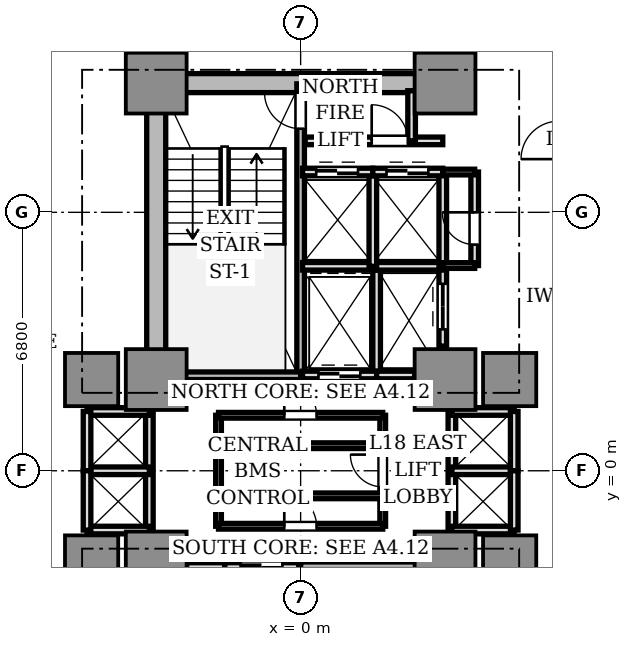
"""IFC4 building model, lengths in metres.
Left out: names, types, materials, properties, quantities, classifications, styles, units other than length and angle.
Written with IfcOpenShell. Run it as: python <this file> out.ifc"""

import sys

from ifc_helpers import new_model, si_unit, direction, frame, frame_2d, origin, origin_2d, place, context, subcontext, project, spatial, rectangle, extrude, source, transform, mapped, element, fill, save


model = new_model("IFC4")
c1 = context("Model", 3, precision=1e-05, world=origin(), true_north=direction((0.0, 1.0)))
c2 = subcontext(c1, "Body", "Model", "MODEL_VIEW")
j1 = project(units=[si_unit("LENGTHUNIT", "METRE"), si_unit("PLANEANGLEUNIT", "RADIAN")], contexts=[c1])
p1 = place(None, origin())
s1 = spatial("IfcSite", under=j1, at=p1, CompositionType="ELEMENT")
p2 = place(p1, origin())
s2 = spatial("IfcBuilding", under=s1, at=p2, CompositionType="ELEMENT")
p3 = place(p2, frame((0.0, 0.0, 67.8)))
s3 = spatial("IfcBuildingStorey", under=s2, at=p3, CompositionType="ELEMENT", Elevation=67.8)
p4 = place(p3, frame((-3.55, 10.2, 0.0), z_axis=(0.0, 0.0, 1.0), x_axis=(1.0, 0.0, 0.0)))
e1 = element("IfcWall", 1, at=p4, inside=s3, PredefinedType="SHEAR", context=c2, shape_type="SweptSolid", body=[
    extrude(rectangle(XDim=7.1, YDim=0.5, at=frame_2d((3.55, 0.0))), origin(), (0.0, 0.0, 1.0), 3.11),
])
p5 = place(p3, frame((-3.8, 2.85, 0.0), z_axis=(0.0, 0.0, 1.0), x_axis=(0.0, 1.0, 0.0)))
e2 = element("IfcWall", 2, at=p5, inside=s3, PredefinedType="SHEAR", context=c2, shape_type="SweptSolid", body=[
    extrude(rectangle(XDim=6.9, YDim=0.5, at=frame_2d((3.45, 0.0))), origin(), (0.0, 0.0, 1.0), 3.11),
])
m1 = source(origin(), c2, "Body", "SweptSolid", [
    extrude(rectangle(XDim=1.6, YDim=1.6, at=origin_2d()), origin(), (0.0, 0.0, 1.0), 3.11),
])
for number, where, z_axis, x_axis in (
    (3, (-3.8, 2.4, 0.0), (0.0, 0.0, 1.0), (1.0, 0.0, 0.0)),
    (4, (3.8, 2.4, 0.0), (0.0, 0.0, 1.0), (1.0, 0.0, 0.0)),
    (5, (-3.8, 10.2, 0.0), (0.0, 0.0, 1.0), (1.0, 0.0, 0.0)),
    (6, (3.8, 10.2, 0.0), (0.0, 0.0, 1.0), (1.0, 0.0, 0.0)),
    (7, (-3.8, -2.4, 0.0), (0.0, 0.0, 1.0), (1.0, 0.0, 0.0)),
    (8, (3.8, -2.4, 0.0), (0.0, 0.0, 1.0), (1.0, 0.0, 0.0)),
):
    element("IfcColumn", number, at=place(p3, frame(where, z_axis=z_axis, x_axis=x_axis)), inside=s3, PredefinedType="COLUMN", context=c2, shape_type="MappedRepresentation", body=[
        mapped(m1, transform((0.0, 0.0, 0.0), scale=1.0)),
    ])
m2 = source(origin(), c2, "Body", "SweptSolid", [
    extrude(rectangle(XDim=1.4, YDim=1.4, at=origin_2d()), origin(), (0.0, 0.0, 1.0), 3.11),
])
for number, where, z_axis, x_axis in (
    (9, (5.5, 2.4, 0.0), (0.0, 0.0, 1.0), (1.0, 0.0, 0.0)),
    (10, (-5.5, 2.4, 0.0), (0.0, 0.0, 1.0), (1.0, 0.0, 0.0)),
    (11, (5.5, -2.4, 0.0), (0.0, 0.0, 1.0), (1.0, 0.0, 0.0)),
    (12, (-5.5, -2.4, 0.0), (0.0, 0.0, 1.0), (1.0, 0.0, 0.0)),
):
    element("IfcColumn", number, at=place(p3, frame(where, z_axis=z_axis, x_axis=x_axis)), inside=s3, PredefinedType="COLUMN", context=c2, shape_type="MappedRepresentation", body=[
        mapped(m2, transform((0.0, 0.0, 0.0), scale=1.0)),
    ])
p6 = place(p3, frame((0.0, 2.5, 0.0), z_axis=(0.0, 0.0, 1.0), x_axis=(0.0, 1.0, 0.0)))
e13 = element("IfcWall", 13, at=p6, inside=s3, PredefinedType="SOLIDWALL", context=c2, shape_type="SweptSolid", body=[
    extrude(rectangle(XDim=7.68, YDim=0.2, at=frame_2d((3.84, 0.0))), origin(), (0.0, 0.0, 1.0), 3.11),
])
p7 = place(p6, frame((6.5, 0.0, 0.0)))
e14 = element("IfcOpeningElement", 14, at=p7, cuts=e13, PredefinedType="OPENING", context=c2, shape_type="SweptSolid", body=[
    extrude(rectangle(XDim=0.95, YDim=2.15, at=frame_2d((0.475, 1.075))), frame((0.0, 0.11, 0.0), z_axis=(0.0, -1.0, 0.0), x_axis=(1.0, 0.0, 0.0)), (0.0, 0.0, 1.0), 0.22),
])
p8 = place(p3, frame((-3.72, 2.5, 0.0), z_axis=(0.0, 0.0, 1.0), x_axis=(1.0, 0.0, 0.0)))
e15 = element("IfcWall", 15, at=p8, inside=s3, PredefinedType="SOLIDWALL", context=c2, shape_type="SweptSolid", body=[
    extrude(rectangle(XDim=3.72, YDim=0.2, at=frame_2d((1.86, 0.0))), origin(), (0.0, 0.0, 1.0), 3.11),
])
p9 = place(p3, frame((0.0, -10.18, 0.0), z_axis=(0.0, 0.0, 1.0), x_axis=(0.0, 1.0, 0.0)))
e16 = element("IfcWall", 16, at=p9, inside=s3, PredefinedType="SOLIDWALL", context=c2, shape_type="SweptSolid", body=[
    extrude(rectangle(XDim=7.68, YDim=0.2, at=frame_2d((3.84, 0.0))), origin(), (0.0, 0.0, 1.0), 3.11),
])
p10 = place(p9, frame((0.28, 0.0, 0.0)))
e17 = element("IfcOpeningElement", 17, at=p10, cuts=e16, PredefinedType="OPENING", context=c2, shape_type="SweptSolid", body=[
    extrude(rectangle(XDim=1.1, YDim=2.15, at=frame_2d((0.55, 1.075))), frame((0.0, 0.11, 0.0), z_axis=(0.0, -1.0, 0.0), x_axis=(1.0, 0.0, 0.0)), (0.0, 0.0, 1.0), 0.22),
])
p11 = place(p3, frame((0.0, -2.5, 0.0), z_axis=(0.0, 0.0, 1.0), x_axis=(1.0, 0.0, 0.0)))
e18 = element("IfcWall", 18, at=p11, inside=s3, PredefinedType="SOLIDWALL", context=c2, shape_type="SweptSolid", body=[
    extrude(rectangle(XDim=3.72, YDim=0.2, at=frame_2d((1.86, 0.0))), origin(), (0.0, 0.0, 1.0), 3.11),
])
p12 = place(p3, frame((2.0, 2.5, 0.0), z_axis=(0.0, 0.0, 1.0), x_axis=(0.0, 1.0, 0.0)))
e19 = element("IfcWall", 19, at=p12, inside=s3, PredefinedType="SOLIDWALL", context=c2, shape_type="SweptSolid", body=[
    extrude(rectangle(XDim=2.78, YDim=0.2, at=frame_2d((1.39, 0.0))), origin(), (0.0, 0.0, 1.0), 2.66),
])
p13 = place(p3, frame((0.05, 2.52, 0.0), z_axis=(0.0, 0.0, 1.0), x_axis=(1.0, 0.0, 0.0)))
e20 = element("IfcWall", 20, at=p13, inside=s3, PredefinedType="SOLIDWALL", context=c2, shape_type="SweptSolid", body=[
    extrude(rectangle(XDim=1.95, YDim=0.2, at=frame_2d((0.975, 0.0))), origin(), (0.0, 0.0, 1.0), 2.66),
])
p14 = place(p13, frame((0.42, 0.0, 0.0)))
e21 = element("IfcOpeningElement", 21, at=p14, cuts=e20, PredefinedType="OPENING", context=c2, shape_type="SweptSolid", body=[
    extrude(rectangle(XDim=1.1, YDim=2.2, at=frame_2d((0.55, 1.1))), frame((0.0, 0.11, 0.0), z_axis=(0.0, -1.0, 0.0), x_axis=(1.0, 0.0, 0.0)), (0.0, 0.0, 1.0), 0.22),
])
p15 = place(p3, frame((-2.0, -5.28, 0.0), z_axis=(0.0, 0.0, 1.0), x_axis=(0.0, 1.0, 0.0)))
e22 = element("IfcWall", 22, at=p15, inside=s3, PredefinedType="SOLIDWALL", context=c2, shape_type="SweptSolid", body=[
    extrude(rectangle(XDim=2.78, YDim=0.2, at=frame_2d((1.39, 0.0))), origin(), (0.0, 0.0, 1.0), 2.66),
])
p16 = place(p3, frame((-2.0, -2.52, 0.0), z_axis=(0.0, 0.0, 1.0), x_axis=(1.0, 0.0, 0.0)))
e23 = element("IfcWall", 23, at=p16, inside=s3, PredefinedType="SOLIDWALL", context=c2, shape_type="SweptSolid", body=[
    extrude(rectangle(XDim=1.95, YDim=0.2, at=frame_2d((0.975, 0.0))), origin(), (0.0, 0.0, 1.0), 2.66),
])
p17 = place(p16, frame((0.42, 0.0, 0.0)))
e24 = element("IfcOpeningElement", 24, at=p17, cuts=e23, PredefinedType="OPENING", context=c2, shape_type="SweptSolid", body=[
    extrude(rectangle(XDim=1.1, YDim=2.2, at=frame_2d((0.55, 1.1))), frame((0.0, 0.11, 0.0), z_axis=(0.0, -1.0, 0.0), x_axis=(1.0, 0.0, 0.0)), (0.0, 0.0, 1.0), 0.22),
])
p18 = place(p3, frame((2.0, 2.52, 0.0), z_axis=(0.0, 0.0, 1.0), x_axis=(1.0, 0.0, 0.0)))
e25 = element("IfcWall", 25, at=p18, inside=s3, PredefinedType="SOLIDWALL", context=c2, shape_type="SweptSolid", body=[
    extrude(rectangle(XDim=1.0, YDim=0.2, at=frame_2d((0.5, 0.0))), origin(), (0.0, 0.0, 1.0), 2.66),
])
p19 = place(p3, frame((3.74, 3.28, 0.0), z_axis=(0.0, 0.0, 1.0), x_axis=(0.0, 1.0, 0.0)))
e26 = element("IfcWall", 26, at=p19, inside=s3, PredefinedType="SOLIDWALL", context=c2, shape_type="SweptSolid", body=[
    extrude(rectangle(XDim=2.08, YDim=0.2, at=frame_2d((1.04, 0.0))), origin(), (0.0, 0.0, 1.0), 2.66),
])
p20 = place(p19, frame((0.44, 0.0, 0.0)))
e27 = element("IfcOpeningElement", 27, at=p20, cuts=e26, PredefinedType="OPENING", context=c2, shape_type="SweptSolid", body=[
    extrude(rectangle(XDim=1.2, YDim=2.2, at=frame_2d((0.6, 1.1))), frame((0.0, 0.11, 0.0), z_axis=(0.0, -1.0, 0.0), x_axis=(1.0, 0.0, 0.0)), (0.0, 0.0, 1.0), 0.22),
])
p21 = place(p3, frame((-3.0, -2.52, 0.0), z_axis=(0.0, 0.0, 1.0), x_axis=(1.0, 0.0, 0.0)))
e28 = element("IfcWall", 28, at=p21, inside=s3, PredefinedType="SOLIDWALL", context=c2, shape_type="SweptSolid", body=[
    extrude(rectangle(XDim=1.0, YDim=0.2, at=frame_2d((0.5, 0.0))), origin(), (0.0, 0.0, 1.0), 2.66),
])
p22 = place(p3, frame((0.05, 5.38, 0.0), z_axis=(0.0, 0.0, 1.0), x_axis=(1.0, 0.0, 0.0)))
e29 = element("IfcWall", 29, at=p22, inside=s3, PredefinedType="SOLIDWALL", context=c2, shape_type="SweptSolid", body=[
    extrude(rectangle(XDim=3.69, YDim=0.2, at=frame_2d((1.845, 0.0))), origin(), (0.0, 0.0, 1.0), 2.66),
])
p23 = place(p3, frame((1.9, 5.38, 0.0), z_axis=(0.0, 0.0, 1.0), x_axis=(0.0, 1.0, 0.0)))
e30 = element("IfcWall", 30, at=p23, inside=s3, PredefinedType="SOLIDWALL", context=c2, shape_type="SweptSolid", body=[
    extrude(rectangle(XDim=2.48, YDim=0.2, at=frame_2d((1.24, 0.0))), origin(), (0.0, 0.0, 1.0), 2.66),
])
p24 = place(p3, frame((0.05, 7.86, 0.0), z_axis=(0.0, 0.0, 1.0), x_axis=(1.0, 0.0, 0.0)))
e31 = element("IfcWall", 31, at=p24, inside=s3, PredefinedType="SOLIDWALL", context=c2, shape_type="SweptSolid", body=[
    extrude(rectangle(XDim=1.85, YDim=0.2, at=frame_2d((0.925, 0.0))), origin(), (0.0, 0.0, 1.0), 2.66),
])
p25 = place(p24, frame((0.36, 0.0, 0.0)))
e32 = element("IfcOpeningElement", 32, at=p25, cuts=e31, PredefinedType="OPENING", context=c2, shape_type="SweptSolid", body=[
    extrude(rectangle(XDim=1.1, YDim=2.2, at=frame_2d((0.55, 1.1))), frame((0.0, 0.11, 0.0), z_axis=(0.0, -1.0, 0.0), x_axis=(1.0, 0.0, 0.0)), (0.0, 0.0, 1.0), 0.22),
])
p26 = place(p3, frame((3.74, 5.38, 0.0), z_axis=(0.0, 0.0, 1.0), x_axis=(0.0, 1.0, 0.0)))
e33 = element("IfcWall", 33, at=p26, inside=s3, PredefinedType="SOLIDWALL", context=c2, shape_type="SweptSolid", body=[
    extrude(rectangle(XDim=2.48, YDim=0.2, at=frame_2d((1.24, 0.0))), origin(), (0.0, 0.0, 1.0), 2.66),
])
p27 = place(p3, frame((1.9, 7.86, 0.0), z_axis=(0.0, 0.0, 1.0), x_axis=(1.0, 0.0, 0.0)))
e34 = element("IfcWall", 34, at=p27, inside=s3, PredefinedType="SOLIDWALL", context=c2, shape_type="SweptSolid", body=[
    extrude(rectangle(XDim=1.84, YDim=0.2, at=frame_2d((0.92, 0.0))), origin(), (0.0, 0.0, 1.0), 2.66),
])
p28 = place(p27, frame((0.36, 0.0, 0.0)))
e35 = element("IfcOpeningElement", 35, at=p28, cuts=e34, PredefinedType="OPENING", context=c2, shape_type="SweptSolid", body=[
    extrude(rectangle(XDim=1.1, YDim=2.2, at=frame_2d((0.55, 1.1))), frame((0.0, 0.11, 0.0), z_axis=(0.0, -1.0, 0.0), x_axis=(1.0, 0.0, 0.0)), (0.0, 0.0, 1.0), 0.22),
])
p29 = place(p3, frame((3.98, -1.56, 0.0), z_axis=(0.0, 0.0, 1.0), x_axis=(0.0, 1.0, 0.0)))
e36 = element("IfcWall", 36, at=p29, inside=s3, PredefinedType="SOLIDWALL", context=c2, shape_type="SweptSolid", body=[
    extrude(rectangle(XDim=3.12, YDim=0.2, at=frame_2d((1.56, 0.0))), origin(), (0.0, 0.0, 1.0), 2.18),
])
for number, where, z_axis, x_axis in (
    (37, (3.98, 1.56, 0.0), (0.0, 0.0, 1.0), (1.0, 0.0, 0.0)),
    (38, (3.98, -1.56, 0.0), (0.0, 0.0, 1.0), (1.0, 0.0, 0.0)),
    (39, (3.98, 0.0, 0.0), (0.0, 0.0, 1.0), (1.0, 0.0, 0.0)),
):
    element("IfcWall", number, at=place(p3, frame(where, z_axis=z_axis, x_axis=x_axis)), inside=s3, PredefinedType="SOLIDWALL", context=c2, shape_type="SweptSolid", body=[
        extrude(rectangle(XDim=1.64, YDim=0.2, at=frame_2d((0.82, 0.0))), origin(), (0.0, 0.0, 1.0), 2.66),
    ])
for number, where, z_axis, x_axis in (
    (40, (5.62, 0.0, 0.0), (0.0, 0.0, 1.0), (0.0, 1.0, 0.0)),
    (41, (5.62, -1.56, 0.0), (0.0, 0.0, 1.0), (0.0, 1.0, 0.0)),
):
    element("IfcWall", number, at=place(p3, frame(where, z_axis=z_axis, x_axis=x_axis)), inside=s3, PredefinedType="SOLIDWALL", context=c2, shape_type="SweptSolid", body=[
        extrude(rectangle(XDim=1.56, YDim=0.2, at=frame_2d((0.78, 0.0))), origin(), (0.0, 0.0, 1.0), 2.66),
    ])
p30 = place(p3, frame((-3.98, -1.56, 0.0), z_axis=(0.0, 0.0, 1.0), x_axis=(0.0, 1.0, 0.0)))
e42 = element("IfcWall", 42, at=p30, inside=s3, PredefinedType="SOLIDWALL", context=c2, shape_type="SweptSolid", body=[
    extrude(rectangle(XDim=3.12, YDim=0.2, at=frame_2d((1.56, 0.0))), origin(), (0.0, 0.0, 1.0), 2.18),
])
for number, where, z_axis, x_axis in (
    (43, (-5.62, 1.56, 0.0), (0.0, 0.0, 1.0), (1.0, 0.0, 0.0)),
    (44, (-5.62, -1.56, 0.0), (0.0, 0.0, 1.0), (1.0, 0.0, 0.0)),
    (45, (-5.62, 0.0, 0.0), (0.0, 0.0, 1.0), (1.0, 0.0, 0.0)),
):
    element("IfcWall", number, at=place(p3, frame(where, z_axis=z_axis, x_axis=x_axis)), inside=s3, PredefinedType="SOLIDWALL", context=c2, shape_type="SweptSolid", body=[
        extrude(rectangle(XDim=1.64, YDim=0.2, at=frame_2d((0.82, 0.0))), origin(), (0.0, 0.0, 1.0), 2.66),
    ])
for number, where, z_axis, x_axis in (
    (46, (-5.62, 0.0, 0.0), (0.0, 0.0, 1.0), (0.0, 1.0, 0.0)),
    (47, (-5.62, -1.56, 0.0), (0.0, 0.0, 1.0), (0.0, 1.0, 0.0)),
):
    element("IfcWall", number, at=place(p3, frame(where, z_axis=z_axis, x_axis=x_axis)), inside=s3, PredefinedType="SOLIDWALL", context=c2, shape_type="SweptSolid", body=[
        extrude(rectangle(XDim=1.56, YDim=0.2, at=frame_2d((0.78, 0.0))), origin(), (0.0, 0.0, 1.0), 2.66),
    ])
p31 = place(p3, frame((0.12, 8.68, 0.0), z_axis=(0.0, 0.0, 1.0), x_axis=(1.0, 0.0, 0.0)))
e48 = element("IfcWall", 48, at=p31, inside=s3, PredefinedType="SOLIDWALL", context=c2, shape_type="SweptSolid", body=[
    extrude(rectangle(XDim=3.62, YDim=0.2, at=frame_2d((1.81, 0.0))), origin(), (0.0, 0.0, 1.0), 2.66),
])
p32 = place(p31, frame((1.75, 0.0, 0.0)))
e49 = element("IfcOpeningElement", 49, at=p32, cuts=e48, PredefinedType="OPENING", context=c2, shape_type="SweptSolid", body=[
    extrude(rectangle(XDim=0.95, YDim=2.15, at=frame_2d((0.475, 1.075))), frame((0.0, 0.11, 0.0), z_axis=(0.0, -1.0, 0.0), x_axis=(1.0, 0.0, 0.0)), (0.0, 0.0, 1.0), 0.22),
])
p33 = place(p3, frame((2.92, 8.68, 0.0), z_axis=(0.0, 0.0, 1.0), x_axis=(0.0, 1.0, 0.0)))
e50 = element("IfcWall", 50, at=p33, inside=s3, PredefinedType="SOLIDWALL", context=c2, shape_type="SweptSolid", body=[
    extrude(rectangle(XDim=1.32, YDim=0.2, at=frame_2d((0.66, 0.0))), origin(), (0.0, 0.0, 1.0), 2.66),
])
p34 = place(p3, frame((4.58, 5.4, 0.0), z_axis=(0.0, 0.0, 1.0), x_axis=(0.0, 1.0, 0.0)))
e51 = element("IfcWall", 51, at=p34, inside=s3, PredefinedType="SOLIDWALL", context=c2, shape_type="SweptSolid", body=[
    extrude(rectangle(XDim=2.46, YDim=0.2, at=frame_2d((1.23, 0.0))), origin(), (0.0, 0.0, 1.0), 2.66),
])
p35 = place(p34, frame((0.55, 0.0, 0.0)))
e52 = element("IfcOpeningElement", 52, at=p35, cuts=e51, PredefinedType="OPENING", context=c2, shape_type="SweptSolid", body=[
    extrude(rectangle(XDim=0.85, YDim=2.1, at=frame_2d((0.425, 1.05))), frame((0.0, 0.11, 0.0), z_axis=(0.0, -1.0, 0.0), x_axis=(1.0, 0.0, 0.0)), (0.0, 0.0, 1.0), 0.22),
])
for number, where, z_axis, x_axis in (
    (53, (3.74, 5.4, 0.0), (0.0, 0.0, 1.0), (1.0, 0.0, 0.0)),
    (54, (3.74, 7.86, 0.0), (0.0, 0.0, 1.0), (1.0, 0.0, 0.0)),
):
    element("IfcWall", number, at=place(p3, frame(where, z_axis=z_axis, x_axis=x_axis)), inside=s3, PredefinedType="PARTITIONING", context=c2, shape_type="SweptSolid", body=[
        extrude(rectangle(XDim=0.84, YDim=0.15, at=frame_2d((0.42, 0.0))), origin(), (0.0, 0.0, 1.0), 2.66),
    ])
p36 = place(p3, frame((2.16, -1.46, 0.0), z_axis=(0.0, 0.0, 1.0), x_axis=(0.0, 1.0, 0.0)))
e55 = element("IfcWall", 55, at=p36, inside=s3, PredefinedType="PARTITIONING", context=c2, shape_type="SweptSolid", body=[
    extrude(rectangle(XDim=2.92, YDim=0.15, at=frame_2d((1.46, 0.0))), origin(), (0.0, 0.0, 1.0), 2.66),
])
p37 = place(p36, frame((1.035, 0.0, 0.0)))
e56 = element("IfcOpeningElement", 56, at=p37, cuts=e55, PredefinedType="OPENING", context=c2, shape_type="SweptSolid", body=[
    extrude(rectangle(XDim=0.85, YDim=2.1, at=frame_2d((0.425, 1.05))), frame((0.0, 0.085, 0.0), z_axis=(0.0, -1.0, 0.0), x_axis=(1.0, 0.0, 0.0)), (0.0, 0.0, 1.0), 0.17),
])
p38 = place(p3, frame((-2.16, -1.46, 0.0), z_axis=(0.0, 0.0, 1.0), x_axis=(0.0, 1.0, 0.0)))
e57 = element("IfcWall", 57, at=p38, inside=s3, PredefinedType="PARTITIONING", context=c2, shape_type="SweptSolid", body=[
    extrude(rectangle(XDim=2.92, YDim=0.15, at=frame_2d((1.46, 0.0))), origin(), (0.0, 0.0, 1.0), 2.66),
])
p39 = place(p3, frame((-2.16, 1.46, 0.0), z_axis=(0.0, 0.0, 1.0), x_axis=(1.0, 0.0, 0.0)))
e58 = element("IfcWall", 58, at=p39, inside=s3, PredefinedType="PARTITIONING", context=c2, shape_type="SweptSolid", body=[
    extrude(rectangle(XDim=4.32, YDim=0.15, at=frame_2d((2.16, 0.0))), origin(), (0.0, 0.0, 1.0), 2.66),
])
p40 = place(p39, frame((1.73, 0.0, 0.0)))
e59 = element("IfcOpeningElement", 59, at=p40, cuts=e58, PredefinedType="OPENING", context=c2, shape_type="SweptSolid", body=[
    extrude(rectangle(XDim=0.85, YDim=2.1, at=frame_2d((0.425, 1.05))), frame((0.0, 0.085, 0.0), z_axis=(0.0, -1.0, 0.0), x_axis=(1.0, 0.0, 0.0)), (0.0, 0.0, 1.0), 0.17),
])
p41 = place(p3, frame((-2.16, -1.46, 0.0), z_axis=(0.0, 0.0, 1.0), x_axis=(1.0, 0.0, 0.0)))
e60 = element("IfcWall", 60, at=p41, inside=s3, PredefinedType="PARTITIONING", context=c2, shape_type="SweptSolid", body=[
    extrude(rectangle(XDim=4.32, YDim=0.15, at=frame_2d((2.16, 0.0))), origin(), (0.0, 0.0, 1.0), 2.66),
])
p42 = place(p41, frame((1.73, 0.0, 0.0)))
e61 = element("IfcOpeningElement", 61, at=p42, cuts=e60, PredefinedType="OPENING", context=c2, shape_type="SweptSolid", body=[
    extrude(rectangle(XDim=0.85, YDim=2.1, at=frame_2d((0.425, 1.05))), frame((0.0, 0.085, 0.0), z_axis=(0.0, -1.0, 0.0), x_axis=(1.0, 0.0, 0.0)), (0.0, 0.0, 1.0), 0.17),
])
for number, where, z_axis, x_axis in (
    (62, (-2.16, 0.66, 0.0), (0.0, 0.0, 1.0), (1.0, 0.0, 0.0)),
    (63, (-2.16, -0.66, 0.0), (0.0, 0.0, 1.0), (1.0, 0.0, 0.0)),
):
    element("IfcWall", number, at=place(p3, frame(where, z_axis=z_axis, x_axis=x_axis)), inside=s3, PredefinedType="PARTITIONING", context=c2, shape_type="SweptSolid", body=[
        extrude(rectangle(XDim=4.32, YDim=0.15, at=frame_2d((2.16, 0.0))), origin(), (0.0, 0.0, 1.0), 2.66),
    ])
m3 = source(origin(), c2, "Body", "SweptSolid", [
    extrude(rectangle(XDim=1.1, YDim=0.05, at=origin_2d()), origin(), (0.0, 0.0, 1.0), 2.2),
])
p43 = place(p14, frame((0.55, 0.0, 0.0)))
e64 = element("IfcDoor", 64, at=p43, inside=s3, OperationType="DOUBLE_DOOR_SLIDING", PredefinedType="DOOR", context=c2, shape_type="MappedRepresentation", body=[
    mapped(m3, transform((0.0, 0.0, 0.0), scale=1.0)),
])
fill(e21, e64)
p44 = place(p17, frame((0.55, 0.0, 0.0)))
e65 = element("IfcDoor", 65, at=p44, inside=s3, OperationType="DOUBLE_DOOR_SLIDING", PredefinedType="DOOR", context=c2, shape_type="MappedRepresentation", body=[
    mapped(m3, transform((0.0, 0.0, 0.0), scale=1.0)),
])
fill(e24, e65)
m4 = source(origin(), c2, "Body", "SweptSolid", [
    extrude(rectangle(XDim=1.2, YDim=0.05, at=origin_2d()), origin(), (0.0, 0.0, 1.0), 2.2),
])
p45 = place(p20, frame((0.6, 0.0, 0.0)))
e66 = element("IfcDoor", 66, at=p45, inside=s3, OperationType="DOUBLE_DOOR_SLIDING", PredefinedType="DOOR", context=c2, shape_type="MappedRepresentation", body=[
    mapped(m4, transform((0.0, 0.0, 0.0), scale=1.0)),
])
fill(e27, e66)
p46 = place(p25, frame((0.55, 0.0, 0.0)))
e67 = element("IfcDoor", 67, at=p46, inside=s3, OperationType="DOUBLE_DOOR_SLIDING", PredefinedType="DOOR", context=c2, shape_type="MappedRepresentation", body=[
    mapped(m3, transform((0.0, 0.0, 0.0), scale=1.0)),
])
fill(e32, e67)
p47 = place(p28, frame((0.55, 0.0, 0.0)))
e68 = element("IfcDoor", 68, at=p47, inside=s3, OperationType="DOUBLE_DOOR_SLIDING", PredefinedType="DOOR", context=c2, shape_type="MappedRepresentation", body=[
    mapped(m3, transform((0.0, 0.0, 0.0), scale=1.0)),
])
fill(e35, e68)
m5 = source(origin(), c2, "Body", "SweptSolid", [
    extrude(rectangle(XDim=0.95, YDim=0.05, at=origin_2d()), origin(), (0.0, 0.0, 1.0), 2.15),
])
p48 = place(p7, frame((0.475, 0.0, 0.0)))
e69 = element("IfcDoor", 69, at=p48, inside=s3, OperationType="SINGLE_SWING_RIGHT", PredefinedType="DOOR", context=c2, shape_type="MappedRepresentation", body=[
    mapped(m5, transform((0.0, 0.0, 0.0), scale=1.0)),
])
fill(e14, e69)
p49 = place(p32, frame((0.475, 0.0, 0.0)))
e70 = element("IfcDoor", 70, at=p49, inside=s3, OperationType="SINGLE_SWING_LEFT", PredefinedType="DOOR", context=c2, shape_type="MappedRepresentation", body=[
    mapped(m5, transform((0.0, 0.0, 0.0), scale=1.0)),
])
fill(e49, e70)
m6 = source(origin(), c2, "Body", "SweptSolid", [
    extrude(rectangle(XDim=0.85, YDim=0.05, at=origin_2d()), origin(), (0.0, 0.0, 1.0), 2.1),
])
p50 = place(p35, frame((0.425, 0.0, 0.0)))
e71 = element("IfcDoor", 71, at=p50, inside=s3, OperationType="SINGLE_SWING_RIGHT", PredefinedType="DOOR", context=c2, shape_type="MappedRepresentation", body=[
    mapped(m6, transform((0.0, 0.0, 0.0), scale=1.0)),
])
fill(e52, e71)
p51 = place(p40, frame((0.425, 0.0, 0.0)))
e72 = element("IfcDoor", 72, at=p51, inside=s3, OperationType="SINGLE_SWING_LEFT", PredefinedType="DOOR", context=c2, shape_type="MappedRepresentation", body=[
    mapped(m6, transform((0.0, 0.0, 0.0), scale=1.0)),
])
fill(e59, e72)
p52 = place(p37, frame((0.425, 0.0, 0.0)))
e73 = element("IfcDoor", 73, at=p52, inside=s3, OperationType="SINGLE_SWING_RIGHT", PredefinedType="DOOR", context=c2, shape_type="MappedRepresentation", body=[
    mapped(m6, transform((0.0, 0.0, 0.0), scale=1.0)),
])
fill(e56, e73)
p53 = place(p42, frame((0.425, 0.0, 0.0)))
e74 = element("IfcDoor", 74, at=p53, inside=s3, OperationType="SINGLE_SWING_LEFT", PredefinedType="DOOR", context=c2, shape_type="MappedRepresentation", body=[
    mapped(m6, transform((0.0, 0.0, 0.0), scale=1.0)),
])
fill(e61, e74)
save(model, sys.argv[1])
